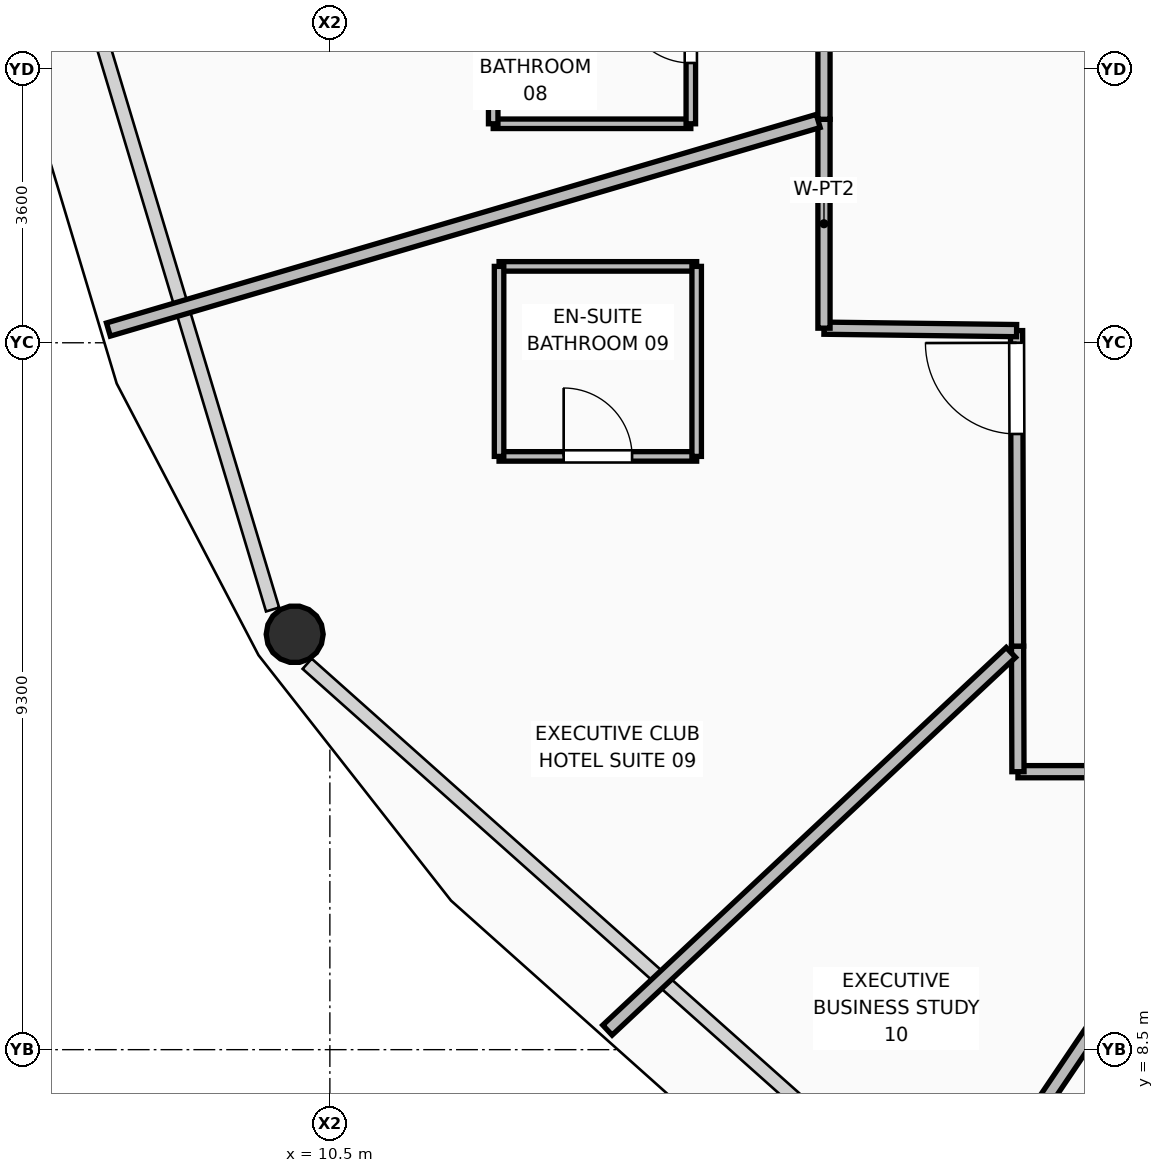
"""IFC4 building model, lengths in metres.
Left out: names, types, materials, properties, quantities, classifications, styles, units other than length and angle.
Written with IfcOpenShell. Run it as: python <this file> out.ifc"""

import sys

from ifc_helpers import new_model, si_unit, direction, frame, frame_2d, origin, origin_2d, place, context, subcontext, project, spatial, rectangle, hollow_circle, extrude, element, fill, save


model = new_model("IFC4")
c1 = context("Model", 3, precision=1e-05, world=origin(), true_north=direction((0.0, 1.0)))
c2 = subcontext(c1, "Body", "Model", "MODEL_VIEW")
j1 = project(units=[si_unit("LENGTHUNIT", "METRE"), si_unit("PLANEANGLEUNIT", "RADIAN")], contexts=[c1])
p1 = place(None, origin())
s1 = spatial("IfcSite", under=j1, at=p1, CompositionType="ELEMENT")
p2 = place(p1, origin())
s2 = spatial("IfcBuilding", under=s1, at=p2, CompositionType="ELEMENT")
p3 = place(p2, frame((0.0, 0.0, 149.7)))
s3 = spatial("IfcBuildingStorey", under=s2, at=p3, CompositionType="ELEMENT", Elevation=149.7)
p4 = place(p3, frame((10.037, 13.965, 0.0), z_axis=(0.0, 0.0, 1.0), x_axis=(1.0, 0.0, 0.0)))
e1 = element("IfcColumn", 1, at=p4, inside=s3, PredefinedType="COLUMN", context=c2, shape_type="SweptSolid", body=[
    extrude(hollow_circle(Radius=0.375, WallThickness=0.035, at=origin_2d()), origin(), (0.0, 0.0, 1.0), 3.57),
])
p5 = place(p3, frame((22.831, 12.158, 0.0), z_axis=(0.0, 0.0, 1.0), x_axis=(-0.999999955626, -0.000297907189, 0.0)))
e2 = element("IfcWall", 2, at=p5, inside=s3, PredefinedType="PARTITIONING", context=c2, shape_type="SweptSolid", body=[
    extrude(rectangle(XDim=3.278, YDim=0.16, at=frame_2d((1.639, 0.0))), origin(), (0.0, 0.0, 1.0), 3.006),
])
p6 = place(p5, frame((0.58, 0.0, 0.0)))
e3 = element("IfcOpeningElement", 3, at=p6, cuts=e2, PredefinedType="OPENING", context=c2, shape_type="SweptSolid", body=[
    extrude(rectangle(XDim=1.0, YDim=2.1, at=frame_2d((0.5, 1.05))), frame((0.0, 0.09, 0.0), z_axis=(0.0, -1.0, 0.0), x_axis=(1.0, 0.0, 0.0)), (0.0, 0.0, 1.0), 0.18),
])
p7 = place(p3, frame((19.553, 12.157, 0.0), z_axis=(0.0, 0.0, 1.0), x_axis=(-0.002955506524, 0.999995632481, 0.0)))
e4 = element("IfcWall", 4, at=p7, inside=s3, PredefinedType="PARTITIONING", context=c2, shape_type="SweptSolid", body=[
    extrude(rectangle(XDim=1.652, YDim=0.16, at=frame_2d((0.826, 0.0))), origin(), (0.0, 0.0, 1.0), 3.55),
])
p8 = place(p3, frame((19.548, 13.809, 0.0), z_axis=(0.0, 0.0, 1.0), x_axis=(-0.00317608091, 0.999994956242, 0.0)))
e5 = element("IfcWall", 5, at=p8, inside=s3, PredefinedType="PARTITIONING", context=c2, shape_type="SweptSolid", body=[
    extrude(rectangle(XDim=4.151, YDim=0.16, at=frame_2d((2.075, 0.0))), origin(), (0.0, 0.0, 1.0), 3.006),
])
p9 = place(p8, frame((2.791, 0.0, 0.0)))
e6 = element("IfcOpeningElement", 6, at=p9, cuts=e5, PredefinedType="OPENING", context=c2, shape_type="SweptSolid", body=[
    extrude(rectangle(XDim=1.2, YDim=2.1, at=frame_2d((0.6, 1.05))), frame((0.0, 0.09, 0.0), z_axis=(0.0, -1.0, 0.0), x_axis=(1.0, 0.0, 0.0)), (0.0, 0.0, 1.0), 0.18),
])
p10 = place(p3, frame((19.535, 17.96, 0.0), z_axis=(0.0, 0.0, 1.0), x_axis=(-0.999920356619, 0.01262063462, 0.0)))
e7 = element("IfcWall", 7, at=p10, inside=s3, PredefinedType="PARTITIONING", context=c2, shape_type="SweptSolid", body=[
    extrude(rectangle(XDim=2.534, YDim=0.16, at=frame_2d((1.267, 0.0))), origin(), (0.0, 0.0, 1.0), 3.55),
])
p11 = place(p3, frame((17.001, 17.992, 0.0), z_axis=(0.0, 0.0, 1.0), x_axis=(0.0, 1.0, 0.0)))
e8 = element("IfcWall", 8, at=p11, inside=s3, PredefinedType="PARTITIONING", context=c2, shape_type="SweptSolid", body=[
    extrude(rectangle(XDim=2.748, YDim=0.16, at=frame_2d((1.374, 0.0))), origin(), (0.0, 0.0, 1.0), 3.55),
])
p12 = place(p3, frame((17.001, 20.74, 0.0), z_axis=(0.0, 0.0, 1.0), x_axis=(0.0, 1.0, 0.0)))
e9 = element("IfcWall", 9, at=p12, inside=s3, PredefinedType="PARTITIONING", context=c2, shape_type="SweptSolid", body=[
    extrude(rectangle(XDim=3.118, YDim=0.16, at=frame_2d((1.559, 0.0))), origin(), (0.0, 0.0, 1.0), 3.006),
])
p13 = place(p3, frame((16.925, 20.718, 0.0), z_axis=(0.0, 0.0, 1.0), x_axis=(-0.959446138816, -0.2818920125, 0.0)))
e10 = element("IfcWall", 10, at=p13, inside=s3, PredefinedType="PARTITIONING", context=c2, shape_type="SweptSolid", body=[
    extrude(rectangle(XDim=9.734, YDim=0.18, at=frame_2d((4.867, 0.0))), origin(), (0.0, 0.0, 1.0), 2.852),
])
p14 = place(p3, frame((19.46, 13.726, 0.0), z_axis=(0.0, 0.0, 1.0), x_axis=(-0.730026032341, -0.683419338404, 0.0)))
e11 = element("IfcWall", 11, at=p14, inside=s3, PredefinedType="PARTITIONING", context=c2, shape_type="SweptSolid", body=[
    extrude(rectangle(XDim=7.271, YDim=0.18, at=frame_2d((3.635, 0.0))), origin(), (0.0, 0.0, 1.0), 2.852),
])
p15 = place(p3, frame((22.775, 12.075, 0.0), z_axis=(0.0, 0.0, 1.0), x_axis=(-0.559569383681, -0.828783509034, 0.0)))
e12 = element("IfcWall", 12, at=p15, inside=s3, PredefinedType="PARTITIONING", context=c2, shape_type="SweptSolid", body=[
    extrude(rectangle(XDim=7.645, YDim=0.18, at=frame_2d((3.822, 0.0))), origin(), (0.0, 0.0, 1.0), 2.852),
])
p16 = place(p3, frame((12.649, 20.681, 0.0), z_axis=(0.0, 0.0, 1.0), x_axis=(1.0, 0.0, 0.0)))
e13 = element("IfcWall", 13, at=p16, inside=s3, PredefinedType="PARTITIONING", context=c2, shape_type="SweptSolid", body=[
    extrude(rectangle(XDim=2.6, YDim=0.125, at=frame_2d((1.3, 0.0))), origin(), (0.0, 0.0, 1.0), 3.55),
])
p17 = place(p3, frame((12.649, 20.681, 0.0), z_axis=(0.0, 0.0, 1.0), x_axis=(0.0, 1.0, 0.0)))
e14 = element("IfcWall", 14, at=p17, inside=s3, PredefinedType="PARTITIONING", context=c2, shape_type="SweptSolid", body=[
    extrude(rectangle(XDim=2.5, YDim=0.125, at=frame_2d((1.25, 0.0))), origin(), (0.0, 0.0, 1.0), 3.006),
])
p18 = place(p3, frame((15.249, 20.681, 0.0), z_axis=(0.0, 0.0, 1.0), x_axis=(0.0, 1.0, 0.0)))
e15 = element("IfcWall", 15, at=p18, inside=s3, PredefinedType="PARTITIONING", context=c2, shape_type="SweptSolid", body=[
    extrude(rectangle(XDim=2.5, YDim=0.125, at=frame_2d((1.25, 0.0))), origin(), (0.0, 0.0, 1.0), 3.006),
])
p19 = place(p18, frame((0.8, 0.0, 0.0)))
e16 = element("IfcOpeningElement", 16, at=p19, cuts=e15, PredefinedType="OPENING", context=c2, shape_type="SweptSolid", body=[
    extrude(rectangle(XDim=0.9, YDim=2.1, at=frame_2d((0.45, 1.05))), frame((0.0, 0.073, 0.0), z_axis=(0.0, -1.0, 0.0), x_axis=(1.0, 0.0, 0.0)), (0.0, 0.0, 1.0), 0.145),
])
p20 = place(p3, frame((12.726, 16.305, 0.0), z_axis=(0.0, 0.0, 1.0), x_axis=(1.0, 0.0, 0.0)))
e17 = element("IfcWall", 17, at=p20, inside=s3, PredefinedType="PARTITIONING", context=c2, shape_type="SweptSolid", body=[
    extrude(rectangle(XDim=2.6, YDim=0.125, at=frame_2d((1.3, 0.0))), origin(), (0.0, 0.0, 1.0), 3.55),
])
p21 = place(p20, frame((0.85, 0.0, 0.0)))
e18 = element("IfcOpeningElement", 18, at=p21, cuts=e17, PredefinedType="OPENING", context=c2, shape_type="SweptSolid", body=[
    extrude(rectangle(XDim=0.9, YDim=2.1, at=frame_2d((0.45, 1.05))), frame((0.0, 0.073, 0.0), z_axis=(0.0, -1.0, 0.0), x_axis=(1.0, 0.0, 0.0)), (0.0, 0.0, 1.0), 0.145),
])
p22 = place(p3, frame((12.726, 18.805, 0.0), z_axis=(0.0, 0.0, 1.0), x_axis=(1.0, 0.0, 0.0)))
e19 = element("IfcWall", 19, at=p22, inside=s3, PredefinedType="PARTITIONING", context=c2, shape_type="SweptSolid", body=[
    extrude(rectangle(XDim=2.6, YDim=0.125, at=frame_2d((1.3, 0.0))), origin(), (0.0, 0.0, 1.0), 3.55),
])
for number, where, z_axis, x_axis in (
    (20, (12.726, 16.305, 0.0), (0.0, 0.0, 1.0), (0.0, 1.0, 0.0)),
    (21, (15.326, 16.305, 0.0), (0.0, 0.0, 1.0), (0.0, 1.0, 0.0)),
):
    element("IfcWall", number, at=place(p3, frame(where, z_axis=z_axis, x_axis=x_axis)), inside=s3, PredefinedType="PARTITIONING", context=c2, shape_type="SweptSolid", body=[
        extrude(rectangle(XDim=2.5, YDim=0.125, at=frame_2d((1.25, 0.0))), origin(), (0.0, 0.0, 1.0), 3.55),
    ])
p23 = place(p19, origin())
e22 = element("IfcDoor", 22, at=p23, inside=s3, OperationType="SINGLE_SWING_RIGHT", PredefinedType="DOOR", context=c2, shape_type="SweptSolid", body=[
    extrude(rectangle(XDim=0.9, YDim=2.1, at=frame_2d((0.45, 1.05))), frame((0.0, 0.025, 0.0), z_axis=(0.0, -1.0, 0.0), x_axis=(1.0, 0.0, 0.0)), (0.0, 0.0, 1.0), 0.05),
])
fill(e16, e22)
p24 = place(p21, origin())
e23 = element("IfcDoor", 23, at=p24, inside=s3, OperationType="SINGLE_SWING_LEFT", PredefinedType="DOOR", context=c2, shape_type="SweptSolid", body=[
    extrude(rectangle(XDim=0.9, YDim=2.1, at=frame_2d((0.45, 1.05))), frame((0.0, 0.025, 0.0), z_axis=(0.0, -1.0, 0.0), x_axis=(1.0, 0.0, 0.0)), (0.0, 0.0, 1.0), 0.05),
])
fill(e18, e23)
p25 = place(p9, origin())
e24 = element("IfcDoor", 24, at=p25, inside=s3, OperationType="SINGLE_SWING_RIGHT", PredefinedType="DOOR", context=c2, shape_type="SweptSolid", body=[
    extrude(rectangle(XDim=1.2, YDim=2.1, at=frame_2d((0.6, 1.05))), frame((0.0, 0.025, 0.0), z_axis=(0.0, -1.0, 0.0), x_axis=(1.0, 0.0, 0.0)), (0.0, 0.0, 1.0), 0.05),
])
fill(e6, e24)
save(model, sys.argv[1])
